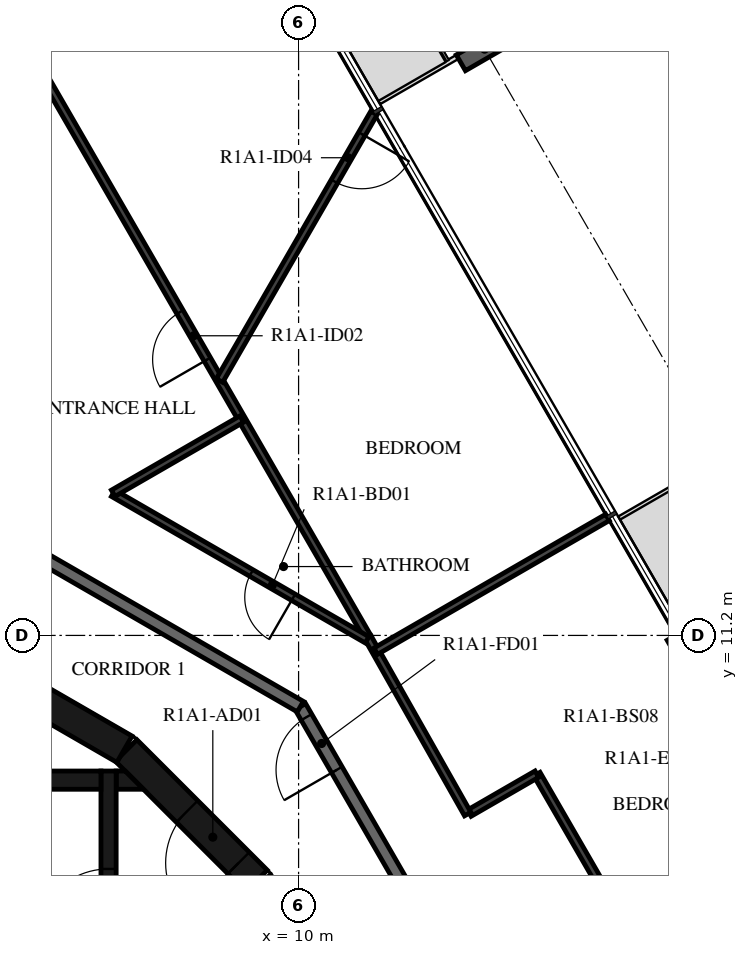
"""IFC4 building model, lengths in metres.
Left out: names, types, materials, properties, quantities, classifications, styles, units other than length and angle.
Written with IfcOpenShell. Run it as: python <this file> out.ifc"""

import sys

from ifc_helpers import new_model, si_unit, direction, frame, frame_2d, origin, origin_2d, place, context, subcontext, project, spatial, polyline, rectangle, i_section, outline, extrude, element, fill, save


model = new_model("IFC4")
c1 = context("Model", 3, precision=1e-05, world=origin(), true_north=direction((0.0, 1.0)))
c2 = subcontext(c1, "Body", "Model", "MODEL_VIEW")
j1 = project(units=[si_unit("LENGTHUNIT", "METRE"), si_unit("PLANEANGLEUNIT", "RADIAN")], contexts=[c1])
p1 = place(None, origin())
s1 = spatial("IfcSite", under=j1, at=p1, CompositionType="ELEMENT")
p2 = place(p1, origin())
s2 = spatial("IfcBuilding", under=s1, at=p2, CompositionType="ELEMENT")
p3 = place(p2, frame((0.0, 0.0, 41.9)))
s3 = spatial("IfcBuildingStorey", under=s2, at=p3, CompositionType="ELEMENT", Elevation=41.9)
p4 = place(p3, frame((13.059, 20.842, -0.38), z_axis=(0.0, 0.0, 1.0), x_axis=(0.50000017485, -0.866025302835, 0.0)))
e1 = element("IfcColumn", 1, at=p4, inside=s3, PredefinedType="COLUMN", context=c2, shape_type="SweptSolid", body=[
    extrude(i_section(OverallWidth=0.3, OverallDepth=0.9, WebThickness=0.019, FlangeThickness=0.035, FilletRadius=0.03, at=origin_2d()), origin(), (0.0, 0.0, 1.0), 3.5),
])
p5 = place(p3, frame((17.731, 8.389, 0.0), z_axis=(0.0, 0.0, 1.0), x_axis=(-0.500028443584, 0.866008981251, 0.0)))
e2 = element("IfcWall", 2, at=p5, inside=s3, PredefinedType="STANDARD", context=c2, shape_type="SweptSolid", body=[
    extrude(rectangle(XDim=3.2, YDim=0.16, at=frame_2d((1.6, 0.0))), origin(), (0.0, 0.0, 1.0), 3.12),
])
p6 = place(p5, frame((0.4, 0.0, 0.0)))
e3 = element("IfcOpeningElement", 3, at=p6, cuts=e2, PredefinedType="OPENING", context=c2, shape_type="SweptSolid", body=[
    extrude(rectangle(XDim=2.4, YDim=2.4, at=frame_2d((1.2, 1.2))), frame((0.0, 0.09, 0.0), z_axis=(0.0, -1.0, 0.0), x_axis=(1.0, 0.0, 0.0)), (0.0, 0.0, 1.0), 0.18),
])
p7 = place(p3, frame((9.308, 7.164, 0.0), z_axis=(0.0, 0.0, 1.0), x_axis=(-0.707106781187, 0.707106781187, 0.0)))
e4 = element("IfcWall", 4, at=p7, inside=s3, PredefinedType="SHEAR", context=c2, shape_type="SweptSolid", body=[
    extrude(rectangle(XDim=3.032, YDim=0.5, at=frame_2d((1.516, 0.0))), origin(), (0.0, 0.0, 1.0), 3.12),
])
p8 = place(p7, frame((0.416, 0.0, 0.0)))
e5 = element("IfcOpeningElement", 5, at=p8, cuts=e4, PredefinedType="OPENING", context=c2, shape_type="SweptSolid", body=[
    extrude(rectangle(XDim=1.2, YDim=2.1, at=frame_2d((0.6, 1.05))), frame((0.0, 0.26, 0.0), z_axis=(0.0, -1.0, 0.0), x_axis=(1.0, 0.0, 0.0)), (0.0, 0.0, 1.0), 0.52),
])
p9 = place(p3, frame((7.137, 9.329, 0.0), z_axis=(0.0, 0.0, 1.0), x_axis=(-0.865975092491, 0.500087131594, 0.0)))
e6 = element("IfcWall", 6, at=p9, inside=s3, PredefinedType="SHEAR", context=c2, shape_type="SweptSolid", body=[
    extrude(rectangle(XDim=3.033, YDim=0.5, at=frame_2d((1.516, 0.0))), origin(), (0.0, 0.0, 1.0), 3.12),
])
p10 = place(p3, frame((0.0, 8.82, 0.0), z_axis=(0.0, 0.0, 1.0), x_axis=(1.0, 0.0, 0.0)))
e7 = element("IfcWall", 7, at=p10, inside=s3, PredefinedType="SHEAR", context=c2, shape_type="SweptSolid", body=[
    extrude(rectangle(XDim=6.75, YDim=0.3, at=frame_2d((3.375, 0.0))), origin(), (0.0, 0.0, 1.0), 3.12),
])
p11 = place(p3, frame((6.875, 5.05, 0.0), z_axis=(0.0, 0.0, 1.0), x_axis=(0.0, 1.0, 0.0)))
e8 = element("IfcWall", 8, at=p11, inside=s3, PredefinedType="SHEAR", context=c2, shape_type="SweptSolid", body=[
    extrude(rectangle(XDim=3.92, YDim=0.25, at=frame_2d((1.96, 0.0))), origin(), (0.0, 0.0, 1.0), 3.12),
])
p12 = place(p11, frame((1.11, 0.0, 0.0)))
e9 = element("IfcOpeningElement", 9, at=p12, cuts=e8, PredefinedType="OPENING", context=c2, shape_type="SweptSolid", body=[
    extrude(rectangle(XDim=1.2, YDim=2.1, at=frame_2d((0.6, 1.05))), frame((0.0, 0.135, 0.0), z_axis=(0.0, -1.0, 0.0), x_axis=(1.0, 0.0, 0.0)), (0.0, 0.0, 1.0), 0.27),
])
p13 = place(p3, origin())
e10 = element("IfcWall", 10, at=p13, inside=s3, PredefinedType="SHEAR", context=c2, shape_type="SweptSolid", body=[
    extrude(outline(polyline([(7.448, 8.67), (7.0, 8.67), (7.0, 8.97), (7.148, 8.97), (7.448, 8.67)])), origin(), (0.0, 0.0, 1.0), 3.12),
])
p14 = place(p3, frame((13.7, 3.671, 0.0), z_axis=(0.0, 0.0, 1.0), x_axis=(-0.500001669485, 0.866024439905, 0.0)))
e11 = element("IfcWall", 11, at=p14, inside=s3, PredefinedType="STANDARD", context=c2, shape_type="SweptSolid", body=[
    extrude(rectangle(XDim=7.342, YDim=0.2, at=frame_2d((3.671, 0.0))), origin(), (0.0, 0.0, 1.0), 3.12),
])
p15 = place(p14, frame((6.142, 0.0, 0.0)))
e12 = element("IfcOpeningElement", 12, at=p15, cuts=e11, PredefinedType="OPENING", context=c2, shape_type="SweptSolid", body=[
    extrude(rectangle(XDim=1.0, YDim=2.1, at=frame_2d((0.5, 1.05))), frame((0.0, 0.11, 0.0), z_axis=(0.0, -1.0, 0.0), x_axis=(1.0, 0.0, 0.0)), (0.0, 0.0, 1.0), 0.22),
])
p16 = place(p3, frame((10.029, 10.029, 0.0), z_axis=(0.0, 0.0, 1.0), x_axis=(-0.866024439905, 0.500001669485, 0.0)))
e13 = element("IfcWall", 13, at=p16, inside=s3, PredefinedType="STANDARD", context=c2, shape_type="SweptSolid", body=[
    extrude(rectangle(XDim=7.342, YDim=0.2, at=frame_2d((3.671, 0.0))), origin(), (0.0, 0.0, 1.0), 3.12),
])
p17 = place(p3, frame((16.119, 5.109, 0.0), z_axis=(0.0, 0.0, 1.0), x_axis=(-0.499988222896, 0.866032203192, 0.0)))
e14 = element("IfcWall", 14, at=p17, inside=s3, PredefinedType="PARTITIONING", context=c2, shape_type="SweptSolid", body=[
    extrude(rectangle(XDim=4.4, YDim=0.12, at=frame_2d((2.2, 0.0))), origin(), (0.0, 0.0, 1.0), 3.12),
])
p18 = place(p17, frame((0.2, 0.0, 0.0)))
e15 = element("IfcOpeningElement", 15, at=p18, cuts=e14, PredefinedType="OPENING", context=c2, shape_type="SweptSolid", body=[
    extrude(rectangle(XDim=0.9, YDim=2.1, at=frame_2d((0.45, 1.05))), frame((0.0, 0.07, 0.0), z_axis=(0.0, -1.0, 0.0), x_axis=(1.0, 0.0, 0.0)), (0.0, 0.0, 1.0), 0.14),
])
p19 = place(p3, frame((13.919, 8.919, 0.0), z_axis=(0.0, 0.0, 1.0), x_axis=(-0.86599869919, -0.500046250861, 0.0)))
e16 = element("IfcWall", 16, at=p19, inside=s3, PredefinedType="PARTITIONING", context=c2, shape_type="SweptSolid", body=[
    extrude(rectangle(XDim=1.284, YDim=0.12, at=frame_2d((0.642, 0.0))), origin(), (0.0, 0.0, 1.0), 3.12),
])
p20 = place(p3, frame((12.781, 8.262, 0.0), z_axis=(0.0, 0.0, 1.0), x_axis=(-0.492233259633, 0.870463335305, 0.0)))
e17 = element("IfcWall", 17, at=p20, inside=s3, PredefinedType="PARTITIONING", context=c2, shape_type="SweptSolid", body=[
    extrude(rectangle(XDim=3.336, YDim=0.12, at=frame_2d((1.668, 0.0))), origin(), (0.0, 0.0, 1.0), 3.12),
])
p21 = place(p3, frame((11.139, 11.167, 0.0), z_axis=(0.0, 0.0, 1.0), x_axis=(-0.499994660107, 0.866028486751, 0.0)))
e18 = element("IfcWall", 18, at=p21, inside=s3, PredefinedType="PARTITIONING", context=c2, shape_type="SweptSolid", body=[
    extrude(rectangle(XDim=15.786, YDim=0.12, at=frame_2d((7.893, 0.0))), origin(), (0.0, 0.0, 1.0), 3.12),
])
p22 = place(p21, frame((5.279, 0.0, 0.0)))
e19 = element("IfcOpeningElement", 19, at=p22, cuts=e18, PredefinedType="OPENING", context=c2, shape_type="SweptSolid", body=[
    extrude(rectangle(XDim=0.9, YDim=2.1, at=frame_2d((0.45, 1.05))), frame((0.0, 0.07, 0.0), z_axis=(0.0, -1.0, 0.0), x_axis=(1.0, 0.0, 0.0)), (0.0, 0.0, 1.0), 0.14),
])
p23 = place(p21, frame((12.23, 0.0, 0.0)))
e20 = element("IfcOpeningElement", 20, at=p23, cuts=e18, PredefinedType="OPENING", context=c2, shape_type="SweptSolid", body=[
    extrude(rectangle(XDim=0.9, YDim=2.1, at=frame_2d((0.45, 1.05))), frame((0.0, 0.07, 0.0), z_axis=(0.0, -1.0, 0.0), x_axis=(1.0, 0.0, 0.0)), (0.0, 0.0, 1.0), 0.14),
])
p24 = place(p3, frame((11.127, 11.127, 0.0), z_axis=(0.0, 0.0, 1.0), x_axis=(-0.866043916853, 0.499967933054, 0.0)))
e21 = element("IfcWall", 21, at=p24, inside=s3, PredefinedType="PARTITIONING", context=c2, shape_type="SweptSolid", body=[
    extrude(rectangle(XDim=4.821, YDim=0.12, at=frame_2d((2.411, 0.0))), origin(), (0.0, 0.0, 1.0), 3.12),
])
p25 = place(p24, frame((1.4, 0.0, 0.0)))
e22 = element("IfcOpeningElement", 22, at=p25, cuts=e21, PredefinedType="OPENING", context=c2, shape_type="SweptSolid", body=[
    extrude(rectangle(XDim=0.8, YDim=2.1, at=frame_2d((0.4, 1.05))), frame((0.0, 0.07, 0.0), z_axis=(0.0, -1.0, 0.0), x_axis=(1.0, 0.0, 0.0)), (0.0, 0.0, 1.0), 0.14),
])
p26 = place(p3, frame((6.952, 13.538, 0.0), z_axis=(0.0, 0.0, 1.0), x_axis=(0.866030657337, 0.49999090047, 0.0)))
e23 = element("IfcWall", 23, at=p26, inside=s3, PredefinedType="PARTITIONING", context=c2, shape_type="SweptSolid", body=[
    extrude(rectangle(XDim=2.44, YDim=0.12, at=frame_2d((1.22, 0.0))), origin(), (0.0, 0.0, 1.0), 3.12),
])
p27 = place(p3, frame((15.08, 13.14, 0.0), z_axis=(0.0, 0.0, 1.0), x_axis=(-0.866032203192, -0.499988222896, 0.0)))
e24 = element("IfcWall", 24, at=p27, inside=s3, PredefinedType="PARTITIONING", context=c2, shape_type="SweptSolid", body=[
    extrude(rectangle(XDim=4.4, YDim=0.12, at=frame_2d((2.2, 0.0))), origin(), (0.0, 0.0, 1.0), 2.73),
])
p28 = place(p3, frame((11.24, 19.792, 0.0), z_axis=(0.0, 0.0, 1.0), x_axis=(-0.499978956711, -0.866037552792, 0.0)))
e25 = element("IfcWall", 25, at=p28, inside=s3, PredefinedType="PARTITIONING", context=c2, shape_type="SweptSolid", body=[
    extrude(rectangle(XDim=5.081, YDim=0.12, at=frame_2d((2.541, 0.0))), origin(), (0.0, 0.0, 1.0), 3.12),
])
p29 = place(p28, frame((0.4, 0.0, 0.0)))
e26 = element("IfcOpeningElement", 26, at=p29, cuts=e25, PredefinedType="OPENING", context=c2, shape_type="SweptSolid", body=[
    extrude(rectangle(XDim=0.9, YDim=2.1, at=frame_2d((0.45, 1.05))), frame((0.0, 0.07, 0.0), z_axis=(0.0, -1.0, 0.0), x_axis=(1.0, 0.0, 0.0)), (0.0, 0.0, 1.0), 0.14),
])
p30 = place(p12, origin())
e27 = element("IfcDoor", 27, at=p30, inside=s3, OperationType="SINGLE_SWING_LEFT", PredefinedType="DOOR", context=c2, shape_type="SweptSolid", body=[
    extrude(rectangle(XDim=1.2, YDim=2.1, at=frame_2d((0.6, 1.05))), frame((0.0, 0.025, 0.0), z_axis=(0.0, -1.0, 0.0), x_axis=(1.0, 0.0, 0.0)), (0.0, 0.0, 1.0), 0.05),
])
fill(e9, e27)
p31 = place(p8, origin())
e28 = element("IfcDoor", 28, at=p31, inside=s3, OperationType="SINGLE_SWING_RIGHT", PredefinedType="DOOR", context=c2, shape_type="SweptSolid", body=[
    extrude(rectangle(XDim=1.2, YDim=2.1, at=frame_2d((0.6, 1.05))), frame((0.0, 0.025, 0.0), z_axis=(0.0, -1.0, 0.0), x_axis=(1.0, 0.0, 0.0)), (0.0, 0.0, 1.0), 0.05),
])
fill(e5, e28)
p32 = place(p15, origin())
e29 = element("IfcDoor", 29, at=p32, inside=s3, OperationType="SINGLE_SWING_RIGHT", PredefinedType="DOOR", context=c2, shape_type="SweptSolid", body=[
    extrude(rectangle(XDim=1.0, YDim=2.1, at=frame_2d((0.5, 1.05))), frame((0.0, 0.025, 0.0), z_axis=(0.0, -1.0, 0.0), x_axis=(1.0, 0.0, 0.0)), (0.0, 0.0, 1.0), 0.05),
])
fill(e12, e29)
p33 = place(p25, origin())
e30 = element("IfcDoor", 30, at=p33, inside=s3, OperationType="SINGLE_SWING_RIGHT", PredefinedType="DOOR", context=c2, shape_type="SweptSolid", body=[
    extrude(rectangle(XDim=0.8, YDim=2.1, at=frame_2d((0.4, 1.05))), frame((0.0, 0.025, 0.0), z_axis=(0.0, -1.0, 0.0), x_axis=(1.0, 0.0, 0.0)), (0.0, 0.0, 1.0), 0.05),
])
fill(e22, e30)
p34 = place(p22, origin())
e31 = element("IfcDoor", 31, at=p34, inside=s3, OperationType="SINGLE_SWING_RIGHT", PredefinedType="DOOR", context=c2, shape_type="SweptSolid", body=[
    extrude(rectangle(XDim=0.9, YDim=2.1, at=frame_2d((0.45, 1.05))), frame((0.0, 0.025, 0.0), z_axis=(0.0, -1.0, 0.0), x_axis=(1.0, 0.0, 0.0)), (0.0, 0.0, 1.0), 0.05),
])
fill(e19, e31)
p35 = place(p29, origin())
e32 = element("IfcDoor", 32, at=p35, inside=s3, OperationType="SINGLE_SWING_LEFT", PredefinedType="DOOR", context=c2, shape_type="SweptSolid", body=[
    extrude(rectangle(XDim=0.9, YDim=2.1, at=frame_2d((0.45, 1.05))), frame((0.0, 0.025, 0.0), z_axis=(0.0, -1.0, 0.0), x_axis=(1.0, 0.0, 0.0)), (0.0, 0.0, 1.0), 0.05),
])
fill(e26, e32)
save(model, sys.argv[1])
